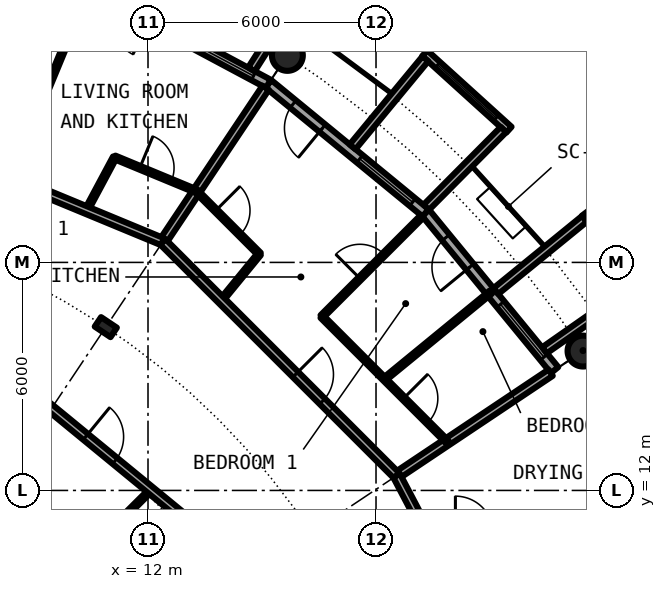
"""IFC4 building model, lengths in metres.
Left out: names, types, materials, properties, quantities, classifications, styles, units other than length and angle.
Written with IfcOpenShell. Run it as: python <this file> out.ifc"""

import sys

from ifc_helpers import new_model, si_unit, direction, frame, frame_2d, origin, origin_2d, place, context, subcontext, project, spatial, rectangle, circle, hollow_circle, i_section, extrude, element, fill, save


model = new_model("IFC4")
c1 = context("Model", 3, precision=1e-05, world=origin(), true_north=direction((0.0, 1.0)))
c2 = subcontext(c1, "Body", "Model", "MODEL_VIEW")
j1 = project(units=[si_unit("LENGTHUNIT", "METRE"), si_unit("PLANEANGLEUNIT", "RADIAN")], contexts=[c1])
p1 = place(None, origin())
s1 = spatial("IfcSite", under=j1, at=p1, CompositionType="ELEMENT")
p2 = place(p1, origin())
s2 = spatial("IfcBuilding", under=s1, at=p2, CompositionType="ELEMENT")
p3 = place(p2, frame((0.0, 0.0, 167.7)))
s3 = spatial("IfcBuildingStorey", under=s2, at=p3, CompositionType="ELEMENT", Elevation=167.7)
for number, where, z_axis, x_axis in (
    (1, (23.448, 15.667, 0.0), (0.0, 0.0, 1.0), (1.0, 0.0, 0.0)),
    (2, (15.667, 23.448, 0.0), (0.0, 0.0, 1.0), (1.0, 0.0, 0.0)),
):
    element("IfcColumn", number, at=place(p3, frame(where, z_axis=z_axis, x_axis=x_axis)), inside=s3, PredefinedType="COLUMN", context=c2, shape_type="SweptSolid", body=[
        extrude(hollow_circle(Radius=0.406, WallThickness=0.04, at=origin_2d()), origin(), (0.0, 0.0, 1.0), 3.05),
    ])
p4 = place(p3, frame((10.889, 16.297, 0.0), z_axis=(0.0, 0.0, 1.0), x_axis=(0.55557023302, 0.831469612303, 0.0)))
e3 = element("IfcColumn", 3, at=p4, inside=s3, PredefinedType="COLUMN", context=c2, shape_type="SweptSolid", body=[
    extrude(i_section(OverallWidth=0.3, OverallDepth=0.5, WebThickness=0.014, FlangeThickness=0.028, FilletRadius=0.027, at=origin_2d()), origin(), (0.0, 0.0, 1.0), 3.05),
])
p5 = place(p3, frame((22.699, 15.167, 0.0), z_axis=(0.0, 0.0, 1.0), x_axis=(-0.634382322723, 0.773019449054, 0.0)))
e4 = element("IfcWall", 4, at=p5, inside=s3, PredefinedType="SOLIDWALL", context=c2, shape_type="SweptSolid", body=[
    extrude(rectangle(XDim=5.352, YDim=0.25, at=frame_2d((2.676, 0.0))), origin(), (0.0, 0.0, 1.0), 2.7),
])
p6 = place(p5, frame((0.441, 0.0, 0.3)))
e5 = element("IfcOpeningElement", 5, at=p6, cuts=e4, PredefinedType="OPENING", context=c2, shape_type="SweptSolid", body=[
    extrude(rectangle(XDim=1.8, YDim=2.1, at=frame_2d((0.9, 1.05))), frame((0.0, 0.135, 0.0), z_axis=(0.0, -1.0, 0.0), x_axis=(1.0, 0.0, 0.0)), (0.0, 0.0, 1.0), 0.27),
])
p7 = place(p5, frame((3.51, 0.0, 0.0)))
e6 = element("IfcOpeningElement", 6, at=p7, cuts=e4, PredefinedType="OPENING", context=c2, shape_type="SweptSolid", body=[
    extrude(rectangle(XDim=1.0, YDim=2.2, at=frame_2d((0.5, 1.1))), frame((0.0, 0.135, 0.0), z_axis=(0.0, -1.0, 0.0), x_axis=(1.0, 0.0, 0.0)), (0.0, 0.0, 1.0), 0.27),
])
p8 = place(p3, frame((24.972, 17.337, -0.03), z_axis=(0.0, 0.0, 1.0), x_axis=(-0.602806268067, 0.797887588059, 0.0)))
e7 = element("IfcWall", 7, at=p8, inside=s3, PredefinedType="SOLIDWALL", context=c2, shape_type="SweptSolid", body=[
    extrude(rectangle(XDim=2.447, YDim=0.2, at=frame_2d((1.223, 0.0))), origin(), (0.0, 0.0, 1.0), 2.73),
])
p9 = place(p8, frame((0.183, 0.0, 0.33)))
e8 = element("IfcOpeningElement", 8, at=p9, cuts=e7, PredefinedType="OPENING", context=c2, shape_type="SweptSolid", body=[
    extrude(circle(Radius=1.04, at=frame_2d((1.04, 1.04))), frame((0.0, 0.11, 0.0), z_axis=(0.0, -1.0, 0.0), x_axis=(1.0, 0.0, 0.0)), (0.0, 0.0, 1.0), 0.22),
])
p10 = place(p3, frame((22.433, 15.688, -0.03), z_axis=(0.0, 0.0, 1.0), x_axis=(0.819373043115, 0.573260687834, 0.0)))
e9 = element("IfcWall", 9, at=p10, inside=s3, PredefinedType="SOLIDWALL", context=c2, shape_type="SweptSolid", body=[
    extrude(rectangle(XDim=2.925, YDim=0.2, at=frame_2d((1.463, 0.0))), origin(), (0.0, 0.0, 1.0), 2.73),
])
p11 = place(p3, frame((21.155, 17.246, -0.03), z_axis=(0.0, 0.0, 1.0), x_axis=(0.775179004516, 0.631741648902, 0.0)))
e10 = element("IfcWall", 10, at=p11, inside=s3, PredefinedType="SOLIDWALL", context=c2, shape_type="SweptSolid", body=[
    extrude(rectangle(XDim=3.006, YDim=0.2, at=frame_2d((1.503, 0.0))), origin(), (0.0, 0.0, 1.0), 2.73),
])
p12 = place(p3, frame((19.304, 19.304, 0.0), z_axis=(0.0, 0.0, 1.0), x_axis=(-0.773019449054, 0.634382322723, 0.0)))
e11 = element("IfcWall", 11, at=p12, inside=s3, PredefinedType="SOLIDWALL", context=c2, shape_type="SweptSolid", body=[
    extrude(rectangle(XDim=5.352, YDim=0.25, at=frame_2d((2.676, 0.0))), origin(), (0.0, 0.0, 1.0), 2.7),
])
p13 = place(p12, frame((0.441, 0.0, 0.3)))
e12 = element("IfcOpeningElement", 12, at=p13, cuts=e11, PredefinedType="OPENING", context=c2, shape_type="SweptSolid", body=[
    extrude(rectangle(XDim=1.8, YDim=2.1, at=frame_2d((0.9, 1.05))), frame((0.0, 0.135, 0.0), z_axis=(0.0, -1.0, 0.0), x_axis=(1.0, 0.0, 0.0)), (0.0, 0.0, 1.0), 0.27),
])
p14 = place(p12, frame((3.51, 0.0, 0.0)))
e13 = element("IfcOpeningElement", 13, at=p14, cuts=e11, PredefinedType="OPENING", context=c2, shape_type="SweptSolid", body=[
    extrude(rectangle(XDim=1.0, YDim=2.2, at=frame_2d((0.5, 1.1))), frame((0.0, 0.135, 0.0), z_axis=(0.0, -1.0, 0.0), x_axis=(1.0, 0.0, 0.0)), (0.0, 0.0, 1.0), 0.27),
])
p15 = place(p3, frame((21.5, 21.493, -0.03), z_axis=(0.0, 0.0, 1.0), x_axis=(-0.740998365753, 0.671506829416, 0.0)))
e14 = element("IfcWall", 14, at=p15, inside=s3, PredefinedType="SOLIDWALL", context=c2, shape_type="SweptSolid", body=[
    extrude(rectangle(XDim=2.993, YDim=0.2, at=frame_2d((1.497, 0.0))), origin(), (0.0, 0.0, 1.0), 2.73),
])
p16 = place(p15, frame((0.457, 0.0, 0.33)))
e15 = element("IfcOpeningElement", 15, at=p16, cuts=e14, PredefinedType="OPENING", context=c2, shape_type="SweptSolid", body=[
    extrude(circle(Radius=1.04, at=frame_2d((1.04, 1.04))), frame((0.0, 0.11, 0.0), z_axis=(0.0, -1.0, 0.0), x_axis=(1.0, 0.0, 0.0)), (0.0, 0.0, 1.0), 0.22),
])
p17 = place(p3, frame((19.323, 19.45, -0.03), z_axis=(0.0, 0.0, 1.0), x_axis=(0.704476739375, 0.709727076896, 0.0)))
e16 = element("IfcWall", 16, at=p17, inside=s3, PredefinedType="SOLIDWALL", context=c2, shape_type="SweptSolid", body=[
    extrude(rectangle(XDim=2.883, YDim=0.2, at=frame_2d((1.441, 0.0))), origin(), (0.0, 0.0, 1.0), 2.73),
])
p18 = place(p3, frame((17.384, 21.041, -0.03), z_axis=(0.0, 0.0, 1.0), x_axis=(0.63709551667, 0.770784861449, 0.0)))
e17 = element("IfcWall", 17, at=p18, inside=s3, PredefinedType="SOLIDWALL", context=c2, shape_type="SweptSolid", body=[
    extrude(rectangle(XDim=3.006, YDim=0.2, at=frame_2d((1.503, 0.0))), origin(), (0.0, 0.0, 1.0), 2.73),
])
p19 = place(p3, frame((15.167, 22.699, 0.0), z_axis=(0.0, 0.0, 1.0), x_axis=(-0.881915646801, 0.471407246368, 0.0)))
e18 = element("IfcWall", 18, at=p19, inside=s3, PredefinedType="SOLIDWALL", context=c2, shape_type="SweptSolid", body=[
    extrude(rectangle(XDim=5.352, YDim=0.25, at=frame_2d((2.676, 0.0))), origin(), (0.0, 0.0, 1.0), 2.7),
])
p20 = place(p19, frame((0.441, 0.0, 0.3)))
e19 = element("IfcOpeningElement", 19, at=p20, cuts=e18, PredefinedType="OPENING", context=c2, shape_type="SweptSolid", body=[
    extrude(rectangle(XDim=1.8, YDim=2.1, at=frame_2d((0.9, 1.05))), frame((0.0, 0.135, 0.0), z_axis=(0.0, -1.0, 0.0), x_axis=(1.0, 0.0, 0.0)), (0.0, 0.0, 1.0), 0.27),
])
p21 = place(p19, frame((3.51, 0.0, 0.0)))
e20 = element("IfcOpeningElement", 20, at=p21, cuts=e18, PredefinedType="OPENING", context=c2, shape_type="SweptSolid", body=[
    extrude(rectangle(XDim=1.0, YDim=2.2, at=frame_2d((0.5, 1.1))), frame((0.0, 0.135, 0.0), z_axis=(0.0, -1.0, 0.0), x_axis=(1.0, 0.0, 0.0)), (0.0, 0.0, 1.0), 0.27),
])
p22 = place(p3, frame((14.722, 23.079, -0.03), z_axis=(0.0, 0.0, 1.0), x_axis=(0.537572179146, 0.843217737129, 0.0)))
e21 = element("IfcWall", 21, at=p22, inside=s3, PredefinedType="SOLIDWALL", context=c2, shape_type="SweptSolid", body=[
    extrude(rectangle(XDim=2.924, YDim=0.2, at=frame_2d((1.462, 0.0))), origin(), (0.0, 0.0, 1.0), 2.73),
])
p23 = place(p3, frame((10.38, 19.374, 0.0), z_axis=(0.0, 0.0, 1.0), x_axis=(0.472002235476, 0.881597351236, 0.0)))
e22 = element("IfcWall", 22, at=p23, inside=s3, PredefinedType="PARTITIONING", context=c2, shape_type="SweptSolid", body=[
    extrude(rectangle(XDim=1.577, YDim=0.1, at=frame_2d((0.788, 0.0))), origin(), (0.0, 0.0, 1.0), 2.7),
])
p24 = place(p3, frame((8.97, 21.657, 0.0), z_axis=(0.0, 0.0, 1.0), x_axis=(0.382761856702, 0.923847044188, 0.0)))
e23 = element("IfcWall", 23, at=p24, inside=s3, PredefinedType="PARTITIONING", context=c2, shape_type="SweptSolid", body=[
    extrude(rectangle(XDim=3.733, YDim=0.1, at=frame_2d((1.867, 0.0))), origin(), (0.0, 0.0, 1.0), 2.7),
])
p25 = place(p24, frame((1.417, 0.0, 0.0)))
e24 = element("IfcOpeningElement", 24, at=p25, cuts=e23, PredefinedType="OPENING", context=c2, shape_type="SweptSolid", body=[
    extrude(rectangle(XDim=0.9, YDim=2.3, at=frame_2d((0.45, 1.15))), frame((0.0, 0.06, 0.0), z_axis=(0.0, -1.0, 0.0), x_axis=(1.0, 0.0, 0.0)), (0.0, 0.0, 1.0), 0.12),
])
p26 = place(p3, frame((9.148, 9.1, 0.0), z_axis=(0.0, 0.0, 1.0), x_axis=(0.708822693149, 0.705386695138, 0.0)))
e25 = element("IfcWall", 25, at=p26, inside=s3, PredefinedType="PARTITIONING", context=c2, shape_type="SweptSolid", body=[
    extrude(rectangle(XDim=4.121, YDim=0.1, at=frame_2d((2.061, 0.0))), origin(), (0.0, 0.0, 1.0), 2.7),
])
p27 = place(p26, frame((1.611, 0.0, 0.0)))
e26 = element("IfcOpeningElement", 26, at=p27, cuts=e25, PredefinedType="OPENING", context=c2, shape_type="SweptSolid", body=[
    extrude(rectangle(XDim=0.9, YDim=2.3, at=frame_2d((0.45, 1.15))), frame((0.0, 0.06, 0.0), z_axis=(0.0, -1.0, 0.0), x_axis=(1.0, 0.0, 0.0)), (0.0, 0.0, 1.0), 0.12),
])
p28 = place(p3, frame((12.388, 18.543, 0.0), z_axis=(0.0, 0.0, 1.0), x_axis=(0.55555521993, 0.831479643532, 0.0)))
e27 = element("IfcWall", 27, at=p28, inside=s3, PredefinedType="PARTITIONING", context=c2, shape_type="SweptSolid", body=[
    extrude(rectangle(XDim=4.875, YDim=0.2, at=frame_2d((2.437, 0.0))), origin(), (0.0, 0.0, 1.0), 2.7),
])
p29 = place(p3, frame((13.93, 17.001, 0.0), z_axis=(0.0, 0.0, 1.0), x_axis=(0.633633636523, 0.773633255921, 0.0)))
e28 = element("IfcWall", 28, at=p29, inside=s3, PredefinedType="PARTITIONING", context=c2, shape_type="SweptSolid", body=[
    extrude(rectangle(XDim=1.578, YDim=0.1, at=frame_2d((0.789, 0.0))), origin(), (0.0, 0.0, 1.0), 2.7),
])
p30 = place(p3, frame((16.575, 16.575, 0.0), z_axis=(0.0, 0.0, 1.0), x_axis=(0.707106781187, 0.707106781187, 0.0)))
e29 = element("IfcWall", 29, at=p30, inside=s3, PredefinedType="PARTITIONING", context=c2, shape_type="SweptSolid", body=[
    extrude(rectangle(XDim=3.735, YDim=0.1, at=frame_2d((1.868, 0.0))), origin(), (0.0, 0.0, 1.0), 2.7),
])
p31 = place(p30, frame((1.417, 0.0, 0.0)))
e30 = element("IfcOpeningElement", 30, at=p31, cuts=e29, PredefinedType="OPENING", context=c2, shape_type="SweptSolid", body=[
    extrude(rectangle(XDim=0.9, YDim=2.3, at=frame_2d((0.45, 1.15))), frame((0.0, 0.06, 0.0), z_axis=(0.0, -1.0, 0.0), x_axis=(1.0, 0.0, 0.0)), (0.0, 0.0, 1.0), 0.12),
])
p32 = place(p3, frame((18.224, 14.927, 0.0), z_axis=(0.0, 0.0, 1.0), x_axis=(0.773548271597, 0.633737383709, 0.0)))
e31 = element("IfcWall", 31, at=p32, inside=s3, PredefinedType="PARTITIONING", context=c2, shape_type="SweptSolid", body=[
    extrude(rectangle(XDim=3.618, YDim=0.1, at=frame_2d((1.809, 0.0))), origin(), (0.0, 0.0, 1.0), 2.7),
])
p33 = place(p3, frame((18.542, 12.389, 0.0), z_axis=(0.0, 0.0, 1.0), x_axis=(0.831387096605, 0.55569370664, 0.0)))
e32 = element("IfcWall", 32, at=p33, inside=s3, PredefinedType="PARTITIONING", context=c2, shape_type="SweptSolid", body=[
    extrude(rectangle(XDim=4.875, YDim=0.2, at=frame_2d((2.438, 0.0))), origin(), (0.0, 0.0, 1.0), 2.7),
])
p34 = place(p3, frame((6.773, 16.353, 0.0), z_axis=(0.0, 0.0, 1.0), x_axis=(0.773034536097, -0.634363938131, 0.0)))
e33 = element("IfcWall", 33, at=p34, inside=s3, PredefinedType="PARTITIONING", context=c2, shape_type="SweptSolid", body=[
    extrude(rectangle(XDim=10.277, YDim=0.2, at=frame_2d((5.138, 0.0))), origin(), (0.0, 0.0, 1.0), 2.7),
])
p35 = place(p34, frame((4.638, 0.0, 0.0)))
e34 = element("IfcOpeningElement", 34, at=p35, cuts=e33, PredefinedType="OPENING", context=c2, shape_type="SweptSolid", body=[
    extrude(rectangle(XDim=1.0, YDim=2.3, at=frame_2d((0.5, 1.15))), frame((0.0, 0.11, 0.0), z_axis=(0.0, -1.0, 0.0), x_axis=(1.0, 0.0, 0.0)), (0.0, 0.0, 1.0), 0.22),
])
p36 = place(p3, frame((4.347, 21.872, 0.0), z_axis=(0.0, 0.0, 1.0), x_axis=(0.923921124994, -0.382583003792, 0.0)))
e35 = element("IfcWall", 35, at=p36, inside=s3, PredefinedType="PARTITIONING", context=c2, shape_type="SweptSolid", body=[
    extrude(rectangle(XDim=8.704, YDim=0.2, at=frame_2d((4.352, 0.0))), origin(), (0.0, 0.0, 1.0), 2.7),
])
p37 = place(p36, frame((2.767, 0.0, 0.0)))
e36 = element("IfcOpeningElement", 36, at=p37, cuts=e35, PredefinedType="OPENING", context=c2, shape_type="SweptSolid", body=[
    extrude(rectangle(XDim=1.0, YDim=2.3, at=frame_2d((0.5, 1.15))), frame((0.0, 0.11, 0.0), z_axis=(0.0, -1.0, 0.0), x_axis=(1.0, 0.0, 0.0)), (0.0, 0.0, 1.0), 0.22),
])
p38 = place(p3, frame((12.389, 18.542, 0.0), z_axis=(0.0, 0.0, 1.0), x_axis=(0.707106781187, -0.707106781187, 0.0)))
e37 = element("IfcWall", 37, at=p38, inside=s3, PredefinedType="PARTITIONING", context=c2, shape_type="SweptSolid", body=[
    extrude(rectangle(XDim=8.702, YDim=0.2, at=frame_2d((4.351, 0.0))), origin(), (0.0, 0.0, 1.0), 2.7),
])
p39 = place(p38, frame((4.938, 0.0, 0.0)))
e38 = element("IfcOpeningElement", 38, at=p39, cuts=e37, PredefinedType="OPENING", context=c2, shape_type="SweptSolid", body=[
    extrude(rectangle(XDim=1.0, YDim=2.3, at=frame_2d((0.5, 1.15))), frame((0.0, 0.11, 0.0), z_axis=(0.0, -1.0, 0.0), x_axis=(1.0, 0.0, 0.0)), (0.0, 0.0, 1.0), 0.22),
])
p40 = place(p3, frame((18.542, 12.389, 0.0), z_axis=(0.0, 0.0, 1.0), x_axis=(0.465605550524, -0.884992356646, 0.0)))
e39 = element("IfcWall", 39, at=p40, inside=s3, PredefinedType="PARTITIONING", context=c2, shape_type="SweptSolid", body=[
    extrude(rectangle(XDim=1.643, YDim=0.2, at=frame_2d((0.821, 0.0))), origin(), (0.0, 0.0, 1.0), 2.7),
])
p41 = place(p3, frame((11.124, 20.764, 0.0), z_axis=(0.0, 0.0, 1.0), x_axis=(0.923938991376, -0.382539854414, 0.0)))
e40 = element("IfcWall", 40, at=p41, inside=s3, PredefinedType="PARTITIONING", context=c2, shape_type="SweptSolid", body=[
    extrude(rectangle(XDim=2.331, YDim=0.1, at=frame_2d((1.166, 0.0))), origin(), (0.0, 0.0, 1.0), 2.7),
])
p42 = place(p41, frame((0.716, 0.0, 0.0)))
e41 = element("IfcOpeningElement", 41, at=p42, cuts=e40, PredefinedType="OPENING", context=c2, shape_type="SweptSolid", body=[
    extrude(rectangle(XDim=0.9, YDim=2.3, at=frame_2d((0.45, 1.15))), frame((0.0, 0.06, 0.0), z_axis=(0.0, -1.0, 0.0), x_axis=(1.0, 0.0, 0.0)), (0.0, 0.0, 1.0), 0.12),
])
p43 = place(p3, frame((13.283, 19.867, 0.0), z_axis=(0.0, 0.0, 1.0), x_axis=(0.707106781187, -0.707106781187, 0.0)))
e42 = element("IfcWall", 42, at=p43, inside=s3, PredefinedType="PARTITIONING", context=c2, shape_type="SweptSolid", body=[
    extrude(rectangle(XDim=2.332, YDim=0.1, at=frame_2d((1.166, 0.0))), origin(), (0.0, 0.0, 1.0), 2.7),
])
p44 = place(p43, frame((0.709, 0.0, 0.0)))
e43 = element("IfcOpeningElement", 43, at=p44, cuts=e42, PredefinedType="OPENING", context=c2, shape_type="SweptSolid", body=[
    extrude(rectangle(XDim=0.9, YDim=2.3, at=frame_2d((0.45, 1.15))), frame((0.0, 0.06, 0.0), z_axis=(0.0, -1.0, 0.0), x_axis=(1.0, 0.0, 0.0)), (0.0, 0.0, 1.0), 0.12),
])
p45 = place(p3, frame((16.575, 16.575, 0.0), z_axis=(0.0, 0.0, 1.0), x_axis=(0.707132961115, -0.707080600289, 0.0)))
e44 = element("IfcWall", 44, at=p45, inside=s3, PredefinedType="PARTITIONING", context=c2, shape_type="SweptSolid", body=[
    extrude(rectangle(XDim=4.663, YDim=0.1, at=frame_2d((2.331, 0.0))), origin(), (0.0, 0.0, 1.0), 2.7),
])
p46 = place(p45, frame((3.043, 0.0, 0.0)))
e45 = element("IfcOpeningElement", 45, at=p46, cuts=e44, PredefinedType="OPENING", context=c2, shape_type="SweptSolid", body=[
    extrude(rectangle(XDim=0.9, YDim=2.3, at=frame_2d((0.45, 1.15))), frame((0.0, 0.06, 0.0), z_axis=(0.0, -1.0, 0.0), x_axis=(1.0, 0.0, 0.0)), (0.0, 0.0, 1.0), 0.12),
])
p47 = place(p6, origin())
e46 = element("IfcWindow", 46, at=p47, inside=s3, PartitioningType="SINGLE_PANEL", PredefinedType="WINDOW", context=c2, shape_type="SweptSolid", body=[
    extrude(rectangle(XDim=1.8, YDim=2.1, at=frame_2d((0.9, 1.05))), frame((0.0, 0.03, 0.0), z_axis=(0.0, -1.0, 0.0), x_axis=(1.0, 0.0, 0.0)), (0.0, 0.0, 1.0), 0.06),
])
fill(e5, e46)
p48 = place(p7, origin())
e47 = element("IfcDoor", 47, at=p48, inside=s3, OperationType="SINGLE_SWING_LEFT", PredefinedType="DOOR", context=c2, shape_type="SweptSolid", body=[
    extrude(rectangle(XDim=1.0, YDim=2.2, at=frame_2d((0.5, 1.1))), frame((0.0, 0.025, 0.0), z_axis=(0.0, -1.0, 0.0), x_axis=(1.0, 0.0, 0.0)), (0.0, 0.0, 1.0), 0.05),
])
fill(e6, e47)
p49 = place(p13, origin())
e48 = element("IfcWindow", 48, at=p49, inside=s3, PartitioningType="SINGLE_PANEL", PredefinedType="WINDOW", context=c2, shape_type="SweptSolid", body=[
    extrude(rectangle(XDim=1.8, YDim=2.1, at=frame_2d((0.9, 1.05))), frame((0.0, 0.03, 0.0), z_axis=(0.0, -1.0, 0.0), x_axis=(1.0, 0.0, 0.0)), (0.0, 0.0, 1.0), 0.06),
])
fill(e12, e48)
p50 = place(p16, origin())
e49 = element("IfcWindow", 49, at=p50, inside=s3, PartitioningType="SINGLE_PANEL", PredefinedType="WINDOW", context=c2, shape_type="SweptSolid", body=[
    extrude(circle(Radius=1.04, at=frame_2d((1.04, 1.04))), frame((0.0, 0.03, 0.0), z_axis=(0.0, -1.0, 0.0), x_axis=(1.0, 0.0, 0.0)), (0.0, 0.0, 1.0), 0.06),
])
fill(e15, e49)
p51 = place(p14, origin())
e50 = element("IfcDoor", 50, at=p51, inside=s3, OperationType="SINGLE_SWING_LEFT", PredefinedType="DOOR", context=c2, shape_type="SweptSolid", body=[
    extrude(rectangle(XDim=1.0, YDim=2.2, at=frame_2d((0.5, 1.1))), frame((0.0, 0.025, 0.0), z_axis=(0.0, -1.0, 0.0), x_axis=(1.0, 0.0, 0.0)), (0.0, 0.0, 1.0), 0.05),
])
fill(e13, e50)
p52 = place(p20, origin())
e51 = element("IfcWindow", 51, at=p52, inside=s3, PartitioningType="SINGLE_PANEL", PredefinedType="WINDOW", context=c2, shape_type="SweptSolid", body=[
    extrude(rectangle(XDim=1.8, YDim=2.1, at=frame_2d((0.9, 1.05))), frame((0.0, 0.03, 0.0), z_axis=(0.0, -1.0, 0.0), x_axis=(1.0, 0.0, 0.0)), (0.0, 0.0, 1.0), 0.06),
])
fill(e19, e51)
p53 = place(p39, origin())
e52 = element("IfcDoor", 52, at=p53, inside=s3, OperationType="SINGLE_SWING_RIGHT", PredefinedType="DOOR", context=c2, shape_type="SweptSolid", body=[
    extrude(rectangle(XDim=1.0, YDim=2.3, at=frame_2d((0.5, 1.15))), frame((0.0, 0.025, 0.0), z_axis=(0.0, -1.0, 0.0), x_axis=(1.0, 0.0, 0.0)), (0.0, 0.0, 1.0), 0.05),
])
fill(e38, e52)
p54 = place(p44, origin())
e53 = element("IfcDoor", 53, at=p54, inside=s3, OperationType="SINGLE_SWING_LEFT", PredefinedType="DOOR", context=c2, shape_type="SweptSolid", body=[
    extrude(rectangle(XDim=0.9, YDim=2.3, at=frame_2d((0.45, 1.15))), frame((0.0, 0.025, 0.0), z_axis=(0.0, -1.0, 0.0), x_axis=(1.0, 0.0, 0.0)), (0.0, 0.0, 1.0), 0.05),
])
fill(e43, e53)
p55 = place(p31, origin())
e54 = element("IfcDoor", 54, at=p55, inside=s3, OperationType="SINGLE_SWING_RIGHT", PredefinedType="DOOR", context=c2, shape_type="SweptSolid", body=[
    extrude(rectangle(XDim=0.9, YDim=2.3, at=frame_2d((0.45, 1.15))), frame((0.0, 0.025, 0.0), z_axis=(0.0, -1.0, 0.0), x_axis=(1.0, 0.0, 0.0)), (0.0, 0.0, 1.0), 0.05),
])
fill(e30, e54)
p56 = place(p46, origin())
e55 = element("IfcDoor", 55, at=p56, inside=s3, OperationType="SINGLE_SWING_RIGHT", PredefinedType="DOOR", context=c2, shape_type="SweptSolid", body=[
    extrude(rectangle(XDim=0.9, YDim=2.3, at=frame_2d((0.45, 1.15))), frame((0.0, 0.025, 0.0), z_axis=(0.0, -1.0, 0.0), x_axis=(1.0, 0.0, 0.0)), (0.0, 0.0, 1.0), 0.05),
])
fill(e45, e55)
p57 = place(p42, origin())
e56 = element("IfcDoor", 56, at=p57, inside=s3, OperationType="SINGLE_SWING_LEFT", PredefinedType="DOOR", context=c2, shape_type="SweptSolid", body=[
    extrude(rectangle(XDim=0.9, YDim=2.3, at=frame_2d((0.45, 1.15))), frame((0.0, 0.025, 0.0), z_axis=(0.0, -1.0, 0.0), x_axis=(1.0, 0.0, 0.0)), (0.0, 0.0, 1.0), 0.05),
])
fill(e41, e56)
p58 = place(p25, origin())
e57 = element("IfcDoor", 57, at=p58, inside=s3, OperationType="SINGLE_SWING_LEFT", PredefinedType="DOOR", context=c2, shape_type="SweptSolid", body=[
    extrude(rectangle(XDim=0.9, YDim=2.3, at=frame_2d((0.45, 1.15))), frame((0.0, 0.025, 0.0), z_axis=(0.0, -1.0, 0.0), x_axis=(1.0, 0.0, 0.0)), (0.0, 0.0, 1.0), 0.05),
])
fill(e24, e57)
p59 = place(p35, origin())
e58 = element("IfcDoor", 58, at=p59, inside=s3, OperationType="SINGLE_SWING_RIGHT", PredefinedType="DOOR", context=c2, shape_type="SweptSolid", body=[
    extrude(rectangle(XDim=1.0, YDim=2.3, at=frame_2d((0.5, 1.15))), frame((0.0, 0.025, 0.0), z_axis=(0.0, -1.0, 0.0), x_axis=(1.0, 0.0, 0.0)), (0.0, 0.0, 1.0), 0.05),
])
fill(e34, e58)
save(model, sys.argv[1])
